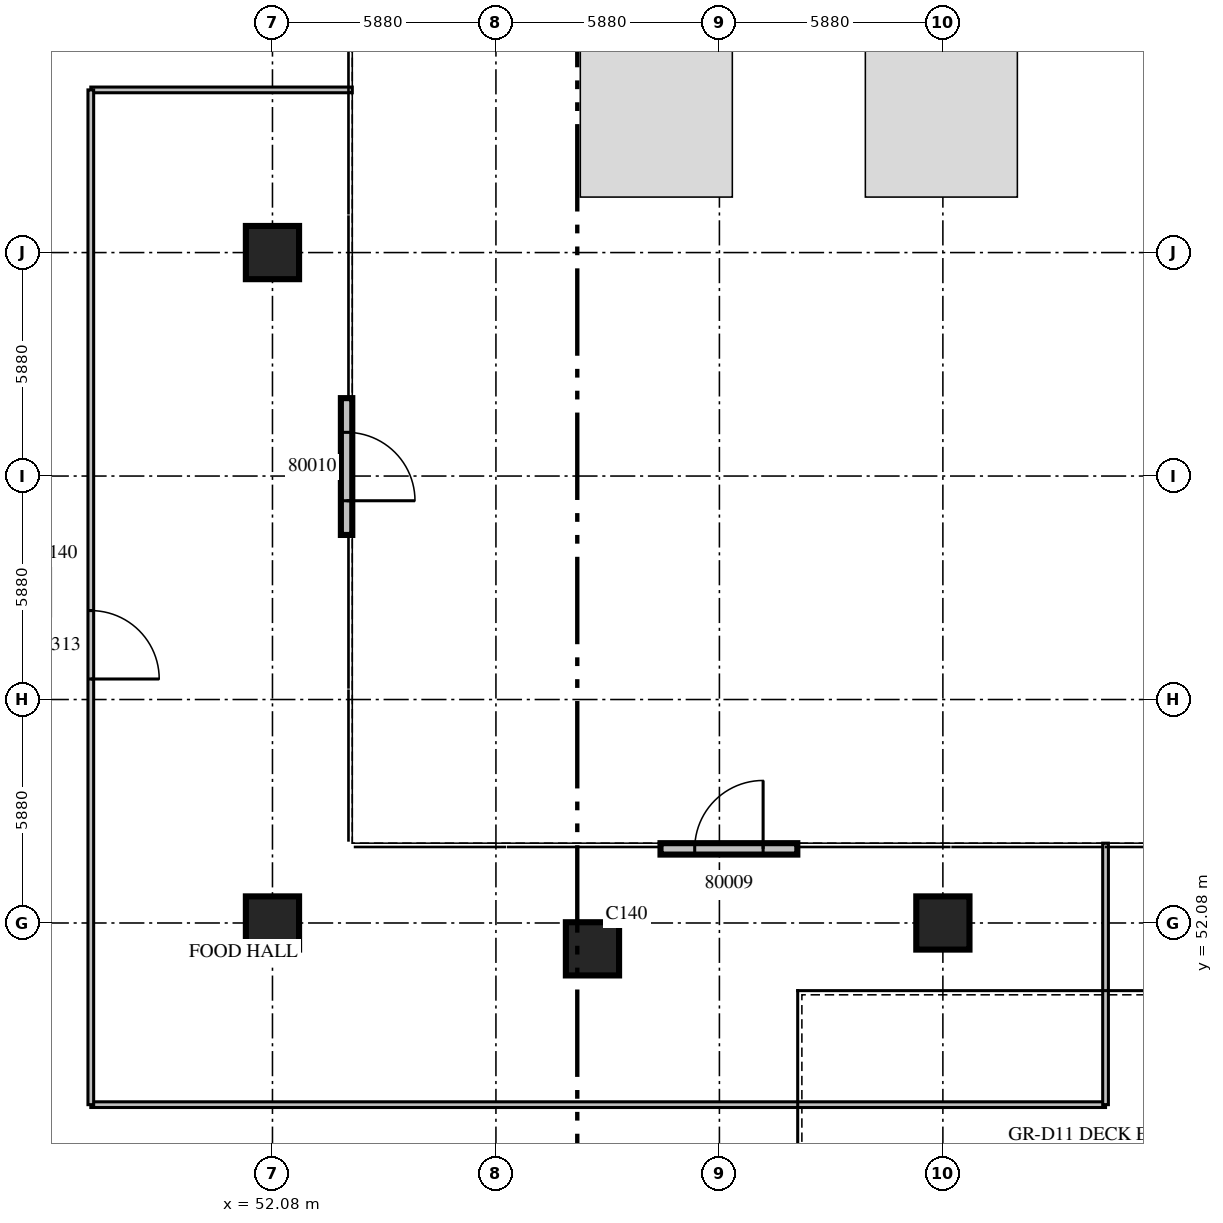
"""IFC4 building model, lengths in metres.
Left out: names, types, materials, properties, quantities, classifications, styles, units other than length and angle.
Written with IfcOpenShell. Run it as: python <this file> out.ifc"""

import sys

from ifc_helpers import new_model, si_unit, direction, frame, frame_2d, origin, origin_2d, place, context, subcontext, project, spatial, rectangle, extrude, source, transform, mapped, element, fill, save


model = new_model("IFC4")
c1 = context("Model", 3, precision=1e-05, world=origin(), true_north=direction((0.0, 1.0)))
c2 = subcontext(c1, "Body", "Model", "MODEL_VIEW")
j1 = project(units=[si_unit("LENGTHUNIT", "METRE"), si_unit("PLANEANGLEUNIT", "RADIAN")], contexts=[c1])
p1 = place(None, origin())
s1 = spatial("IfcSite", under=j1, at=p1, CompositionType="ELEMENT")
p2 = place(p1, origin())
s2 = spatial("IfcBuilding", under=s1, at=p2, CompositionType="ELEMENT")
p3 = place(p2, origin())
s3 = spatial("IfcBuildingStorey", under=s2, at=p3, CompositionType="ELEMENT", Elevation=0.0)
m1 = source(origin(), c2, "Body", "SweptSolid", [
    extrude(rectangle(XDim=1.4, YDim=1.4, at=origin_2d()), origin(), (0.0, 0.0, 1.0), 7.5),
])
for number, where, z_axis, x_axis in (
    (1, (52.08, 52.08, 0.0), (0.0, 0.0, 1.0), (1.0, 0.0, 0.0)),
    (2, (52.08, 69.72, 0.0), (0.0, 0.0, 1.0), (1.0, 0.0, 0.0)),
    (3, (60.5, 51.4, 0.0), (0.0, 0.0, 1.0), (1.0, 0.0, 0.0)),
    (4, (69.72, 52.08, 0.0), (0.0, 0.0, 1.0), (1.0, 0.0, 0.0)),
):
    element("IfcColumn", number, at=place(p3, frame(where, z_axis=z_axis, x_axis=x_axis)), inside=s3, PredefinedType="COLUMN", context=c2, shape_type="MappedRepresentation", body=[
        mapped(m1, transform((0.0, 0.0, 0.0), scale=1.0)),
    ])
m2 = source(origin(), c2, "Body", "SweptSolid", [
    extrude(rectangle(XDim=3.6, YDim=0.3, at=frame_2d((1.8, 0.0))), origin(), (0.0, 0.0, 1.0), 6.9),
])
p4 = place(p3, frame((65.89, 54.03, 0.0), z_axis=(0.0, 0.0, 1.0), x_axis=(-1.0, 0.0, 0.0)))
e5 = element("IfcWall", 5, at=p4, inside=s3, PredefinedType="STANDARD", context=c2, shape_type="MappedRepresentation", body=[
    mapped(m2, transform((0.0, 0.0, 0.0), scale=1.0)),
])
m3 = source(origin(), c2, "Body", "SweptSolid", [
    extrude(rectangle(XDim=1.8, YDim=2.4, at=frame_2d((0.9, 1.2))), frame((0.0, 0.16, 0.0), z_axis=(0.0, -1.0, 0.0), x_axis=(1.0, 0.0, 0.0)), (0.0, 0.0, 1.0), 0.32),
])
p5 = place(p4, frame((0.9, 0.0, 0.0)))
e6 = element("IfcOpeningElement", 6, at=p5, cuts=e5, PredefinedType="OPENING", context=c2, shape_type="MappedRepresentation", body=[
    mapped(m3, transform((0.0, 0.0, 0.0), scale=1.0)),
])
p6 = place(p3, frame((54.03, 62.29, 0.0), z_axis=(0.0, 0.0, 1.0), x_axis=(0.0, 1.0, 0.0)))
e7 = element("IfcWall", 7, at=p6, inside=s3, PredefinedType="STANDARD", context=c2, shape_type="MappedRepresentation", body=[
    mapped(m2, transform((0.0, 0.0, 0.0), scale=1.0)),
])
p7 = place(p6, frame((0.9, 0.0, 0.0)))
e8 = element("IfcOpeningElement", 8, at=p7, cuts=e7, PredefinedType="OPENING", context=c2, shape_type="MappedRepresentation", body=[
    mapped(m3, transform((0.0, 0.0, 0.0), scale=1.0)),
])
m4 = source(origin(), c2, "Body", "SweptSolid", [
    extrude(rectangle(XDim=26.7, YDim=0.15, at=frame_2d((13.35, 0.0))), origin(), (0.0, 0.0, 1.0), 6.9),
])
p8 = place(p3, frame((47.3, 47.3, 0.0), z_axis=(0.0, 0.0, 1.0), x_axis=(1.0, 0.0, 0.0)))
e9 = element("IfcWall", 9, at=p8, inside=s3, PredefinedType="PARTITIONING", context=c2, shape_type="MappedRepresentation", body=[
    mapped(m4, transform((0.0, 0.0, 0.0), scale=1.0)),
])
p9 = place(p3, frame((47.3, 74.0, 0.0), z_axis=(0.0, 0.0, 1.0), x_axis=(1.0, 0.0, 0.0)))
e10 = element("IfcWall", 10, at=p9, inside=s3, PredefinedType="PARTITIONING", context=c2, shape_type="SweptSolid", body=[
    extrude(rectangle(XDim=6.88, YDim=0.15, at=frame_2d((3.44, 0.0))), origin(), (0.0, 0.0, 1.0), 6.9),
])
p10 = place(p3, frame((47.3, 47.3, 0.0), z_axis=(0.0, 0.0, 1.0), x_axis=(0.0, 1.0, 0.0)))
e11 = element("IfcWall", 11, at=p10, inside=s3, PredefinedType="PARTITIONING", context=c2, shape_type="MappedRepresentation", body=[
    mapped(m4, transform((0.0, 0.0, 0.0), scale=1.0)),
])
m5 = source(origin(), c2, "Body", "SweptSolid", [
    extrude(rectangle(XDim=1.8, YDim=2.1, at=frame_2d((0.9, 1.05))), frame((0.0, 0.085, 0.0), z_axis=(0.0, -1.0, 0.0), x_axis=(1.0, 0.0, 0.0)), (0.0, 0.0, 1.0), 0.17),
])
p11 = place(p10, frame((11.2, 0.0, 0.0)))
e12 = element("IfcOpeningElement", 12, at=p11, cuts=e11, PredefinedType="OPENING", context=c2, shape_type="MappedRepresentation", body=[
    mapped(m5, transform((0.0, 0.0, 0.0), scale=1.0)),
])
m6 = source(origin(), c2, "Body", "SweptSolid", [
    extrude(rectangle(XDim=6.88, YDim=0.15, at=frame_2d((3.44, 0.0))), origin(), (0.0, 0.0, 1.0), 6.9),
])
p12 = place(p3, frame((74.0, 47.3, 0.0), z_axis=(0.0, 0.0, 1.0), x_axis=(0.0, 1.0, 0.0)))
e13 = element("IfcWall", 13, at=p12, inside=s3, PredefinedType="PARTITIONING", context=c2, shape_type="MappedRepresentation", body=[
    mapped(m6, transform((0.0, 0.0, 0.0), scale=1.0)),
])
m7 = source(origin(), c2, "Body", "SweptSolid", [
    extrude(rectangle(XDim=1.8, YDim=2.4, at=frame_2d((0.9, 1.2))), frame((0.0, 0.025, 0.0), z_axis=(0.0, -1.0, 0.0), x_axis=(1.0, 0.0, 0.0)), (0.0, 0.0, 1.0), 0.05),
])
p13 = place(p5, origin())
e14 = element("IfcDoor", 14, at=p13, inside=s3, OperationType="DOUBLE_DOOR_SINGLE_SWING", PredefinedType="DOOR", context=c2, shape_type="MappedRepresentation", body=[
    mapped(m7, transform((0.0, 0.0, 0.0), scale=1.0)),
])
fill(e6, e14)
p14 = place(p7, origin())
e15 = element("IfcDoor", 15, at=p14, inside=s3, OperationType="DOUBLE_DOOR_SINGLE_SWING", PredefinedType="DOOR", context=c2, shape_type="MappedRepresentation", body=[
    mapped(m7, transform((0.0, 0.0, 0.0), scale=1.0)),
])
fill(e8, e15)
m8 = source(origin(), c2, "Body", "SweptSolid", [
    extrude(rectangle(XDim=1.8, YDim=2.1, at=frame_2d((0.9, 1.05))), frame((0.0, 0.025, 0.0), z_axis=(0.0, -1.0, 0.0), x_axis=(1.0, 0.0, 0.0)), (0.0, 0.0, 1.0), 0.05),
])
p15 = place(p11, origin())
e16 = element("IfcDoor", 16, at=p15, inside=s3, OperationType="DOUBLE_DOOR_SINGLE_SWING", PredefinedType="DOOR", context=c2, shape_type="MappedRepresentation", body=[
    mapped(m8, transform((0.0, 0.0, 0.0), scale=1.0)),
])
fill(e12, e16)
save(model, sys.argv[1])
